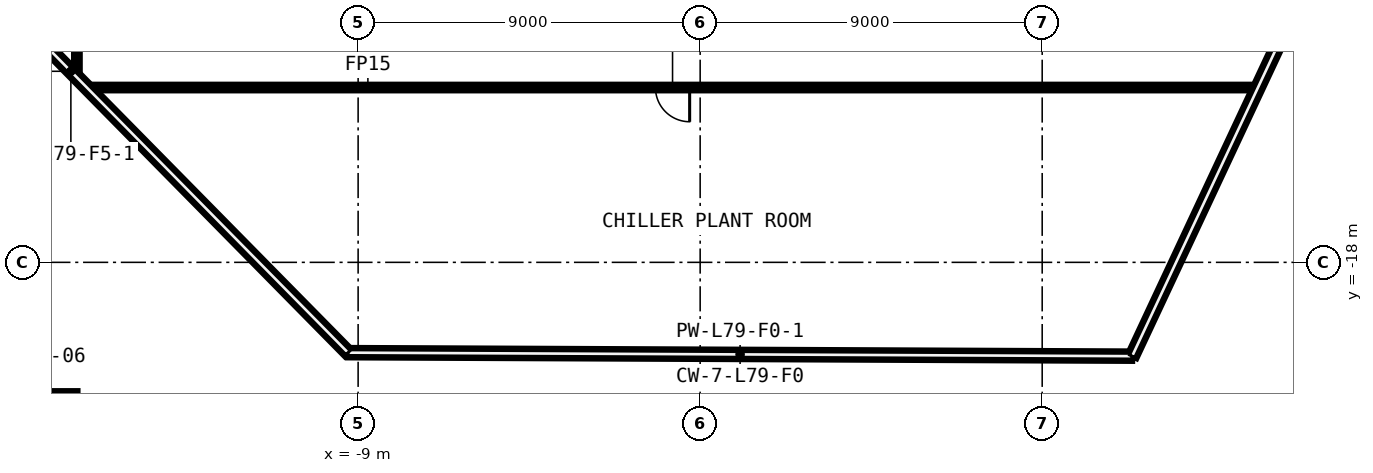
"""IFC4 building model, lengths in metres.
Left out: names, types, materials, properties, quantities, classifications, styles, units other than length and angle.
Written with IfcOpenShell. Run it as: python <this file> out.ifc"""

import sys

from ifc_helpers import new_model, si_unit, direction, frame, frame_2d, origin, origin_2d, place, context, subcontext, project, spatial, rectangle, hollow_rectangle, extrude, element, fill, save


model = new_model("IFC4")
c1 = context("Model", 3, precision=1e-05, world=origin(), true_north=direction((0.0, 1.0)))
c2 = subcontext(c1, "Body", "Model", "MODEL_VIEW")
j1 = project(units=[si_unit("LENGTHUNIT", "METRE"), si_unit("PLANEANGLEUNIT", "RADIAN")], contexts=[c1])
p1 = place(None, origin())
s1 = spatial("IfcSite", under=j1, at=p1, CompositionType="ELEMENT")
p2 = place(p1, origin())
s2 = spatial("IfcBuilding", under=s1, at=p2, CompositionType="ELEMENT")
p3 = place(p2, frame((0.0, 0.0, 367.4)))
s3 = spatial("IfcBuildingStorey", under=s2, at=p3, CompositionType="ELEMENT", Elevation=367.4)
p4 = place(p3, frame((-17.084, -22.089, 0.0), z_axis=(0.0, 0.0, 1.0), x_axis=(1.0, 0.0, 0.0)))
e1 = element("IfcColumn", 1, at=p4, inside=s3, PredefinedType="COLUMN", context=c2, shape_type="SweptSolid", body=[
    extrude(hollow_rectangle(XDim=1.4, YDim=1.4, WallThickness=0.06, at=origin_2d()), origin(), (0.0, 0.0, 1.0), 4.2),
])
p5 = place(p3, frame((14.656, -13.4, 0.0), z_axis=(0.0, 0.0, 1.0), x_axis=(-1.0, 0.0, 0.0)))
e2 = element("IfcWall", 2, at=p5, inside=s3, PredefinedType="PARTITIONING", context=c2, shape_type="SweptSolid", body=[
    extrude(rectangle(XDim=30.765, YDim=0.15, at=frame_2d((15.383, 0.0))), origin(), (0.0, 0.0, 1.0), 3.8),
])
p6 = place(p5, frame((14.933, 0.0, 0.0)))
e3 = element("IfcOpeningElement", 3, at=p6, cuts=e2, PredefinedType="OPENING", context=c2, shape_type="SweptSolid", body=[
    extrude(rectangle(XDim=0.9, YDim=2.1, at=frame_2d((0.45, 1.05))), frame((0.0, 0.085, 0.0), z_axis=(0.0, -1.0, 0.0), x_axis=(1.0, 0.0, 0.0)), (0.0, 0.0, 1.0), 0.17),
])
p7 = place(p3, frame((-16.4, -13.105, 0.0), z_axis=(0.0, 0.0, 1.0), x_axis=(0.0, 1.0, 0.0)))
e4 = element("IfcWall", 4, at=p7, inside=s3, PredefinedType="PARTITIONING", context=c2, shape_type="SweptSolid", body=[
    extrude(rectangle(XDim=22.641, YDim=0.15, at=frame_2d((11.321, 0.0))), origin(), (0.0, 0.0, 1.0), 3.8),
])
p8 = place(p7, frame((10.871, 0.0, 0.0)))
e5 = element("IfcOpeningElement", 5, at=p8, cuts=e4, PredefinedType="OPENING", context=c2, shape_type="SweptSolid", body=[
    extrude(rectangle(XDim=0.9, YDim=2.1, at=frame_2d((0.45, 1.05))), frame((0.0, 0.085, 0.0), z_axis=(0.0, -1.0, 0.0), x_axis=(1.0, 0.0, 0.0)), (0.0, 0.0, 1.0), 0.17),
])
p9 = place(p3, frame((-9.266, -20.377, 0.0), z_axis=(0.0, 0.0, 1.0), x_axis=(0.999990050783, -0.004460755013, 0.0)))
e6 = element("IfcWall", 6, at=p9, inside=s3, PredefinedType="SOLIDWALL", context=c2, shape_type="SweptSolid", body=[
    extrude(rectangle(XDim=20.634, YDim=0.25, at=frame_2d((10.317, 0.0))), origin(), (0.0, 0.0, 1.0), 3.8),
])
p10 = place(p3, frame((11.367, -20.469, 0.0), z_axis=(0.0, 0.0, 1.0), x_axis=(0.424125024155, 0.905603646131, 0.0)))
e7 = element("IfcWall", 7, at=p10, inside=s3, PredefinedType="SOLIDWALL", context=c2, shape_type="SweptSolid", body=[
    extrude(rectangle(XDim=28.801, YDim=0.25, at=frame_2d((14.401, 0.0))), origin(), (0.0, 0.0, 1.0), 3.8),
])
p11 = place(p3, frame((-23.851, -5.568, 0.0), z_axis=(0.0, 0.0, 1.0), x_axis=(0.701718568407, -0.712454244673, 0.0)))
e8 = element("IfcWall", 8, at=p11, inside=s3, PredefinedType="SOLIDWALL", context=c2, shape_type="SweptSolid", body=[
    extrude(rectangle(XDim=20.785, YDim=0.25, at=frame_2d((10.393, 0.0))), origin(), (0.0, 0.0, 1.0), 3.8),
])
p12 = place(p6, origin())
e9 = element("IfcDoor", 9, at=p12, inside=s3, OperationType="SINGLE_SWING_LEFT", PredefinedType="DOOR", context=c2, shape_type="SweptSolid", body=[
    extrude(rectangle(XDim=0.9, YDim=2.1, at=frame_2d((0.45, 1.05))), frame((0.0, 0.025, 0.0), z_axis=(0.0, -1.0, 0.0), x_axis=(1.0, 0.0, 0.0)), (0.0, 0.0, 1.0), 0.05),
])
fill(e3, e9)
save(model, sys.argv[1])
